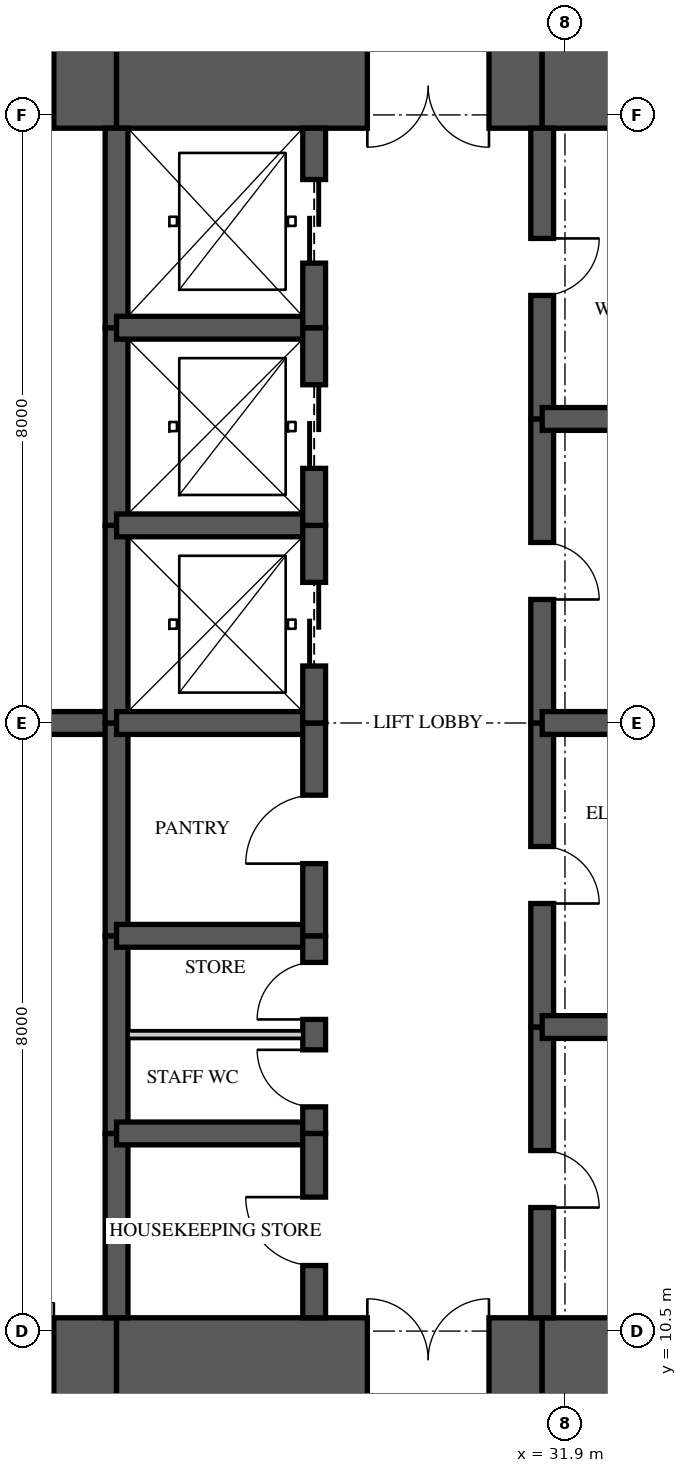
"""IFC4 building model, lengths in metres.
Left out: names, types, materials, properties, quantities, classifications, styles, units other than length and angle.
Written with IfcOpenShell. Run it as: python <this file> out.ifc"""

import sys

from ifc_helpers import new_model, si_unit, direction, frame, frame_2d, origin, place, context, subcontext, project, spatial, rectangle, extrude, element, fill, save


model = new_model("IFC4")
c1 = context("Model", 3, precision=1e-05, world=origin(), true_north=direction((0.0, 1.0)))
c2 = subcontext(c1, "Body", "Model", "MODEL_VIEW")
j1 = project(units=[si_unit("LENGTHUNIT", "METRE"), si_unit("PLANEANGLEUNIT", "RADIAN")], contexts=[c1])
p1 = place(None, origin())
s1 = spatial("IfcSite", under=j1, at=p1, CompositionType="ELEMENT")
p2 = place(p1, origin())
s2 = spatial("IfcBuilding", under=s1, at=p2, CompositionType="ELEMENT")
p3 = place(p2, frame((0.0, 0.0, 263.85)))
s3 = spatial("IfcBuildingStorey", under=s2, at=p3, CompositionType="ELEMENT", Elevation=263.85)
p4 = place(p3, frame((19.725, 10.125, 0.0), z_axis=(0.0, 0.0, 1.0), x_axis=(1.0, 0.0, 0.0)))
e1 = element("IfcWall", 1, at=p4, inside=s3, PredefinedType="SHEAR", context=c2, shape_type="SweptSolid", body=[
    extrude(rectangle(XDim=6.275, YDim=1.1, at=frame_2d((3.137, 0.0))), origin(), (0.0, 0.0, 1.0), 3.9),
])
p5 = place(p4, frame((4.7, 0.0, 0.0)))
e2 = element("IfcOpeningElement", 2, at=p5, cuts=e1, PredefinedType="OPENING", context=c2, shape_type="SweptSolid", body=[
    extrude(rectangle(XDim=0.75, YDim=2.1, at=frame_2d((0.375, 1.05))), frame((0.0, 0.56, 0.0), z_axis=(0.0, -1.0, 0.0), x_axis=(1.0, 0.0, 0.0)), (0.0, 0.0, 1.0), 1.12),
])
p6 = place(p3, frame((26.0, 10.125, 0.0), z_axis=(0.0, 0.0, 1.0), x_axis=(1.0, 0.0, 0.0)))
e3 = element("IfcWall", 3, at=p6, inside=s3, PredefinedType="SHEAR", context=c2, shape_type="SweptSolid", body=[
    extrude(rectangle(XDim=5.6, YDim=1.1, at=frame_2d((2.8, 0.0))), origin(), (0.0, 0.0, 1.0), 3.9),
])
p7 = place(p6, frame((3.3, 0.0, 0.0)))
e4 = element("IfcOpeningElement", 4, at=p7, cuts=e3, PredefinedType="OPENING", context=c2, shape_type="SweptSolid", body=[
    extrude(rectangle(XDim=1.6, YDim=2.1, at=frame_2d((0.8, 1.05))), frame((0.0, 0.56, 0.0), z_axis=(0.0, -1.0, 0.0), x_axis=(1.0, 0.0, 0.0)), (0.0, 0.0, 1.0), 1.12),
])
for number, where, z_axis, x_axis in (
    (5, (31.6, 10.125, 0.0), (0.0, 0.0, 1.0), (1.0, 0.0, 0.0)),
    (6, (35.9, 26.875, 0.0), (0.0, 0.0, 1.0), (-1.0, 0.0, 0.0)),
):
    element("IfcWall", number, at=place(p3, frame(where, z_axis=z_axis, x_axis=x_axis)), inside=s3, PredefinedType="SHEAR", context=c2, shape_type="SweptSolid", body=[
        extrude(rectangle(XDim=4.3, YDim=1.1, at=frame_2d((2.15, 0.0))), origin(), (0.0, 0.0, 1.0), 3.9),
    ])
p8 = place(p3, frame((31.6, 26.875, 0.0), z_axis=(0.0, 0.0, 1.0), x_axis=(-1.0, 0.0, 0.0)))
e7 = element("IfcWall", 7, at=p8, inside=s3, PredefinedType="SHEAR", context=c2, shape_type="SweptSolid", body=[
    extrude(rectangle(XDim=5.6, YDim=1.1, at=frame_2d((2.8, 0.0))), origin(), (0.0, 0.0, 1.0), 3.9),
])
p9 = place(p8, frame((0.7, 0.0, 0.0)))
e8 = element("IfcOpeningElement", 8, at=p9, cuts=e7, PredefinedType="OPENING", context=c2, shape_type="SweptSolid", body=[
    extrude(rectangle(XDim=1.6, YDim=2.1, at=frame_2d((0.8, 1.05))), frame((0.0, 0.56, 0.0), z_axis=(0.0, -1.0, 0.0), x_axis=(1.0, 0.0, 0.0)), (0.0, 0.0, 1.0), 1.12),
])
p10 = place(p3, frame((26.0, 26.875, 0.0), z_axis=(0.0, 0.0, 1.0), x_axis=(-1.0, 0.0, 0.0)))
e9 = element("IfcWall", 9, at=p10, inside=s3, PredefinedType="SHEAR", context=c2, shape_type="SweptSolid", body=[
    extrude(rectangle(XDim=6.275, YDim=1.1, at=frame_2d((3.137, 0.0))), origin(), (0.0, 0.0, 1.0), 3.9),
])
p11 = place(p10, frame((0.825, 0.0, 0.0)))
e10 = element("IfcOpeningElement", 10, at=p11, cuts=e9, PredefinedType="OPENING", context=c2, shape_type="SweptSolid", body=[
    extrude(rectangle(XDim=0.75, YDim=2.1, at=frame_2d((0.375, 1.05))), frame((0.0, 0.56, 0.0), z_axis=(0.0, -1.0, 0.0), x_axis=(1.0, 0.0, 0.0)), (0.0, 0.0, 1.0), 1.12),
])
p12 = place(p3, frame((26.0, 10.675, 0.0), z_axis=(0.0, 0.0, 1.0), x_axis=(0.0, 1.0, 0.0)))
e11 = element("IfcWall", 11, at=p12, inside=s3, PredefinedType="SHEAR", context=c2, shape_type="SweptSolid", body=[
    extrude(rectangle(XDim=2.425, YDim=0.3, at=frame_2d((1.212, 0.0))), origin(), (0.0, 0.0, 1.0), 3.9),
])
p13 = place(p3, frame((26.0, 13.1, 0.0), z_axis=(0.0, 0.0, 1.0), x_axis=(0.0, 1.0, 0.0)))
e12 = element("IfcWall", 12, at=p13, inside=s3, PredefinedType="SHEAR", context=c2, shape_type="SweptSolid", body=[
    extrude(rectangle(XDim=2.6, YDim=0.3, at=frame_2d((1.3, 0.0))), origin(), (0.0, 0.0, 1.0), 3.9),
])
p14 = place(p3, frame((26.0, 15.7, 0.0), z_axis=(0.0, 0.0, 1.0), x_axis=(0.0, 1.0, 0.0)))
e13 = element("IfcWall", 13, at=p14, inside=s3, PredefinedType="SHEAR", context=c2, shape_type="SweptSolid", body=[
    extrude(rectangle(XDim=2.8, YDim=0.3, at=frame_2d((1.4, 0.0))), origin(), (0.0, 0.0, 1.0), 3.9),
])
p15 = place(p3, frame((26.0, 18.5, 0.0), z_axis=(0.0, 0.0, 1.0), x_axis=(0.0, 1.0, 0.0)))
e14 = element("IfcWall", 14, at=p15, inside=s3, PredefinedType="SHEAR", context=c2, shape_type="SweptSolid", body=[
    extrude(rectangle(XDim=2.6, YDim=0.3, at=frame_2d((1.3, 0.0))), origin(), (0.0, 0.0, 1.0), 3.9),
])
p16 = place(p3, frame((26.0, 21.1, 0.0), z_axis=(0.0, 0.0, 1.0), x_axis=(0.0, 1.0, 0.0)))
e15 = element("IfcWall", 15, at=p16, inside=s3, PredefinedType="SHEAR", context=c2, shape_type="SweptSolid", body=[
    extrude(rectangle(XDim=2.6, YDim=0.3, at=frame_2d((1.3, 0.0))), origin(), (0.0, 0.0, 1.0), 3.9),
])
p17 = place(p3, frame((26.0, 23.7, 0.0), z_axis=(0.0, 0.0, 1.0), x_axis=(0.0, 1.0, 0.0)))
e16 = element("IfcWall", 16, at=p17, inside=s3, PredefinedType="SHEAR", context=c2, shape_type="SweptSolid", body=[
    extrude(rectangle(XDim=2.625, YDim=0.3, at=frame_2d((1.312, 0.0))), origin(), (0.0, 0.0, 1.0), 3.9),
])
p18 = place(p3, frame((28.6, 10.675, 0.0), z_axis=(0.0, 0.0, 1.0), x_axis=(0.0, 1.0, 0.0)))
e17 = element("IfcWall", 17, at=p18, inside=s3, PredefinedType="SHEAR", context=c2, shape_type="SweptSolid", body=[
    extrude(rectangle(XDim=2.425, YDim=0.3, at=frame_2d((1.212, 0.0))), origin(), (0.0, 0.0, 1.0), 3.9),
])
p19 = place(p18, frame((0.688, 0.0, 0.0)))
e18 = element("IfcOpeningElement", 18, at=p19, cuts=e17, PredefinedType="OPENING", context=c2, shape_type="SweptSolid", body=[
    extrude(rectangle(XDim=0.9, YDim=2.1, at=frame_2d((0.45, 1.05))), frame((0.0, 0.16, 0.0), z_axis=(0.0, -1.0, 0.0), x_axis=(1.0, 0.0, 0.0)), (0.0, 0.0, 1.0), 0.32),
])
p20 = place(p3, frame((28.6, 13.1, 0.0), z_axis=(0.0, 0.0, 1.0), x_axis=(0.0, 1.0, 0.0)))
e19 = element("IfcWall", 19, at=p20, inside=s3, PredefinedType="SHEAR", context=c2, shape_type="SweptSolid", body=[
    extrude(rectangle(XDim=2.6, YDim=0.3, at=frame_2d((1.3, 0.0))), origin(), (0.0, 0.0, 1.0), 3.9),
])
p21 = place(p20, frame((0.35, 0.0, 0.0)))
e20 = element("IfcOpeningElement", 20, at=p21, cuts=e19, PredefinedType="OPENING", context=c2, shape_type="SweptSolid", body=[
    extrude(rectangle(XDim=0.75, YDim=2.1, at=frame_2d((0.375, 1.05))), frame((0.0, 0.16, 0.0), z_axis=(0.0, -1.0, 0.0), x_axis=(1.0, 0.0, 0.0)), (0.0, 0.0, 1.0), 0.32),
])
p22 = place(p20, frame((1.5, 0.0, 0.0)))
e21 = element("IfcOpeningElement", 21, at=p22, cuts=e19, PredefinedType="OPENING", context=c2, shape_type="SweptSolid", body=[
    extrude(rectangle(XDim=0.75, YDim=2.1, at=frame_2d((0.375, 1.05))), frame((0.0, 0.16, 0.0), z_axis=(0.0, -1.0, 0.0), x_axis=(1.0, 0.0, 0.0)), (0.0, 0.0, 1.0), 0.32),
])
p23 = place(p3, frame((28.6, 15.7, 0.0), z_axis=(0.0, 0.0, 1.0), x_axis=(0.0, 1.0, 0.0)))
e22 = element("IfcWall", 22, at=p23, inside=s3, PredefinedType="SHEAR", context=c2, shape_type="SweptSolid", body=[
    extrude(rectangle(XDim=2.8, YDim=0.3, at=frame_2d((1.4, 0.0))), origin(), (0.0, 0.0, 1.0), 3.9),
])
p24 = place(p23, frame((0.95, 0.0, 0.0)))
e23 = element("IfcOpeningElement", 23, at=p24, cuts=e22, PredefinedType="OPENING", context=c2, shape_type="SweptSolid", body=[
    extrude(rectangle(XDim=0.9, YDim=2.1, at=frame_2d((0.45, 1.05))), frame((0.0, 0.16, 0.0), z_axis=(0.0, -1.0, 0.0), x_axis=(1.0, 0.0, 0.0)), (0.0, 0.0, 1.0), 0.32),
])
p25 = place(p3, frame((28.6, 18.5, 0.0), z_axis=(0.0, 0.0, 1.0), x_axis=(0.0, 1.0, 0.0)))
e24 = element("IfcWall", 24, at=p25, inside=s3, PredefinedType="SHEAR", context=c2, shape_type="SweptSolid", body=[
    extrude(rectangle(XDim=2.6, YDim=0.3, at=frame_2d((1.3, 0.0))), origin(), (0.0, 0.0, 1.0), 3.9),
])
p26 = place(p25, frame((0.75, 0.0, 0.0)))
e25 = element("IfcOpeningElement", 25, at=p26, cuts=e24, PredefinedType="OPENING", context=c2, shape_type="SweptSolid", body=[
    extrude(rectangle(XDim=1.1, YDim=2.1, at=frame_2d((0.55, 1.05))), frame((0.0, 0.16, 0.0), z_axis=(0.0, -1.0, 0.0), x_axis=(1.0, 0.0, 0.0)), (0.0, 0.0, 1.0), 0.32),
])
p27 = place(p3, frame((28.6, 21.1, 0.0), z_axis=(0.0, 0.0, 1.0), x_axis=(0.0, 1.0, 0.0)))
e26 = element("IfcWall", 26, at=p27, inside=s3, PredefinedType="SHEAR", context=c2, shape_type="SweptSolid", body=[
    extrude(rectangle(XDim=2.6, YDim=0.3, at=frame_2d((1.3, 0.0))), origin(), (0.0, 0.0, 1.0), 3.9),
])
p28 = place(p27, frame((0.75, 0.0, 0.0)))
e27 = element("IfcOpeningElement", 27, at=p28, cuts=e26, PredefinedType="OPENING", context=c2, shape_type="SweptSolid", body=[
    extrude(rectangle(XDim=1.1, YDim=2.1, at=frame_2d((0.55, 1.05))), frame((0.0, 0.16, 0.0), z_axis=(0.0, -1.0, 0.0), x_axis=(1.0, 0.0, 0.0)), (0.0, 0.0, 1.0), 0.32),
])
p29 = place(p3, frame((28.6, 23.7, 0.0), z_axis=(0.0, 0.0, 1.0), x_axis=(0.0, 1.0, 0.0)))
e28 = element("IfcWall", 28, at=p29, inside=s3, PredefinedType="SHEAR", context=c2, shape_type="SweptSolid", body=[
    extrude(rectangle(XDim=2.625, YDim=0.3, at=frame_2d((1.312, 0.0))), origin(), (0.0, 0.0, 1.0), 3.9),
])
p30 = place(p29, frame((0.85, 0.0, 0.0)))
e29 = element("IfcOpeningElement", 29, at=p30, cuts=e28, PredefinedType="OPENING", context=c2, shape_type="SweptSolid", body=[
    extrude(rectangle(XDim=1.1, YDim=2.1, at=frame_2d((0.55, 1.05))), frame((0.0, 0.16, 0.0), z_axis=(0.0, -1.0, 0.0), x_axis=(1.0, 0.0, 0.0)), (0.0, 0.0, 1.0), 0.32),
])
p31 = place(p3, frame((31.6, 10.675, 0.0), z_axis=(0.0, 0.0, 1.0), x_axis=(0.0, 1.0, 0.0)))
e30 = element("IfcWall", 30, at=p31, inside=s3, PredefinedType="SHEAR", context=c2, shape_type="SweptSolid", body=[
    extrude(rectangle(XDim=3.825, YDim=0.3, at=frame_2d((1.913, 0.0))), origin(), (0.0, 0.0, 1.0), 3.9),
])
p32 = place(p31, frame((1.45, 0.0, 0.0)))
e31 = element("IfcOpeningElement", 31, at=p32, cuts=e30, PredefinedType="OPENING", context=c2, shape_type="SweptSolid", body=[
    extrude(rectangle(XDim=0.75, YDim=2.1, at=frame_2d((0.375, 1.05))), frame((0.0, 0.16, 0.0), z_axis=(0.0, -1.0, 0.0), x_axis=(1.0, 0.0, 0.0)), (0.0, 0.0, 1.0), 0.32),
])
p33 = place(p3, frame((31.6, 14.5, 0.0), z_axis=(0.0, 0.0, 1.0), x_axis=(0.0, 1.0, 0.0)))
e32 = element("IfcWall", 32, at=p33, inside=s3, PredefinedType="SHEAR", context=c2, shape_type="SweptSolid", body=[
    extrude(rectangle(XDim=4.0, YDim=0.3, at=frame_2d((2.0, 0.0))), origin(), (0.0, 0.0, 1.0), 3.9),
])
p34 = place(p33, frame((1.625, 0.0, 0.0)))
e33 = element("IfcOpeningElement", 33, at=p34, cuts=e32, PredefinedType="OPENING", context=c2, shape_type="SweptSolid", body=[
    extrude(rectangle(XDim=0.75, YDim=2.1, at=frame_2d((0.375, 1.05))), frame((0.0, 0.16, 0.0), z_axis=(0.0, -1.0, 0.0), x_axis=(1.0, 0.0, 0.0)), (0.0, 0.0, 1.0), 0.32),
])
p35 = place(p3, frame((31.6, 18.5, 0.0), z_axis=(0.0, 0.0, 1.0), x_axis=(0.0, 1.0, 0.0)))
e34 = element("IfcWall", 34, at=p35, inside=s3, PredefinedType="SHEAR", context=c2, shape_type="SweptSolid", body=[
    extrude(rectangle(XDim=4.0, YDim=0.3, at=frame_2d((2.0, 0.0))), origin(), (0.0, 0.0, 1.0), 3.9),
])
p36 = place(p35, frame((1.625, 0.0, 0.0)))
e35 = element("IfcOpeningElement", 35, at=p36, cuts=e34, PredefinedType="OPENING", context=c2, shape_type="SweptSolid", body=[
    extrude(rectangle(XDim=0.75, YDim=2.1, at=frame_2d((0.375, 1.05))), frame((0.0, 0.16, 0.0), z_axis=(0.0, -1.0, 0.0), x_axis=(1.0, 0.0, 0.0)), (0.0, 0.0, 1.0), 0.32),
])
p37 = place(p3, frame((31.6, 22.5, 0.0), z_axis=(0.0, 0.0, 1.0), x_axis=(0.0, 1.0, 0.0)))
e36 = element("IfcWall", 36, at=p37, inside=s3, PredefinedType="SHEAR", context=c2, shape_type="SweptSolid", body=[
    extrude(rectangle(XDim=3.825, YDim=0.3, at=frame_2d((1.913, 0.0))), origin(), (0.0, 0.0, 1.0), 3.9),
])
p38 = place(p37, frame((1.625, 0.0, 0.0)))
e37 = element("IfcOpeningElement", 37, at=p38, cuts=e36, PredefinedType="OPENING", context=c2, shape_type="SweptSolid", body=[
    extrude(rectangle(XDim=0.75, YDim=2.1, at=frame_2d((0.375, 1.05))), frame((0.0, 0.16, 0.0), z_axis=(0.0, -1.0, 0.0), x_axis=(1.0, 0.0, 0.0)), (0.0, 0.0, 1.0), 0.32),
])
p39 = place(p3, frame((23.6, 18.5, 0.0), z_axis=(0.0, 0.0, 1.0), x_axis=(1.0, 0.0, 0.0)))
e38 = element("IfcWall", 38, at=p39, inside=s3, PredefinedType="SHEAR", context=c2, shape_type="SweptSolid", body=[
    extrude(rectangle(XDim=2.4, YDim=0.3, at=frame_2d((1.2, 0.0))), origin(), (0.0, 0.0, 1.0), 3.9),
])
for number, where, z_axis, x_axis in (
    (39, (26.0, 13.1, 0.0), (0.0, 0.0, 1.0), (1.0, 0.0, 0.0)),
    (40, (26.0, 15.7, 0.0), (0.0, 0.0, 1.0), (1.0, 0.0, 0.0)),
    (41, (26.0, 18.5, 0.0), (0.0, 0.0, 1.0), (1.0, 0.0, 0.0)),
    (42, (26.0, 21.1, 0.0), (0.0, 0.0, 1.0), (1.0, 0.0, 0.0)),
    (43, (26.0, 23.7, 0.0), (0.0, 0.0, 1.0), (1.0, 0.0, 0.0)),
):
    element("IfcWall", number, at=place(p3, frame(where, z_axis=z_axis, x_axis=x_axis)), inside=s3, PredefinedType="SHEAR", context=c2, shape_type="SweptSolid", body=[
        extrude(rectangle(XDim=2.6, YDim=0.3, at=frame_2d((1.3, 0.0))), origin(), (0.0, 0.0, 1.0), 3.9),
    ])
for number, where, z_axis, x_axis in (
    (44, (31.6, 14.5, 0.0), (0.0, 0.0, 1.0), (1.0, 0.0, 0.0)),
    (45, (31.6, 18.5, 0.0), (0.0, 0.0, 1.0), (1.0, 0.0, 0.0)),
    (46, (31.6, 22.5, 0.0), (0.0, 0.0, 1.0), (1.0, 0.0, 0.0)),
):
    element("IfcWall", number, at=place(p3, frame(where, z_axis=z_axis, x_axis=x_axis)), inside=s3, PredefinedType="SHEAR", context=c2, shape_type="SweptSolid", body=[
        extrude(rectangle(XDim=4.3, YDim=0.3, at=frame_2d((2.15, 0.0))), origin(), (0.0, 0.0, 1.0), 3.9),
    ])
p40 = place(p3, frame((26.15, 14.4, 0.0), z_axis=(0.0, 0.0, 1.0), x_axis=(1.0, 0.0, 0.0)))
e47 = element("IfcWall", 47, at=p40, inside=s3, PredefinedType="PARTITIONING", context=c2, shape_type="SweptSolid", body=[
    extrude(rectangle(XDim=2.3, YDim=0.1, at=frame_2d((1.15, 0.0))), origin(), (0.0, 0.0, 1.0), 3.62),
])
p41 = place(p26, origin())
e48 = element("IfcDoor", 48, at=p41, inside=s3, OperationType="SLIDING_TO_LEFT", PredefinedType="DOOR", context=c2, shape_type="SweptSolid", body=[
    extrude(rectangle(XDim=1.1, YDim=2.1, at=frame_2d((0.55, 1.05))), frame((0.0, 0.025, 0.0), z_axis=(0.0, -1.0, 0.0), x_axis=(1.0, 0.0, 0.0)), (0.0, 0.0, 1.0), 0.05),
])
fill(e25, e48)
p42 = place(p28, origin())
e49 = element("IfcDoor", 49, at=p42, inside=s3, OperationType="SLIDING_TO_LEFT", PredefinedType="DOOR", context=c2, shape_type="SweptSolid", body=[
    extrude(rectangle(XDim=1.1, YDim=2.1, at=frame_2d((0.55, 1.05))), frame((0.0, 0.025, 0.0), z_axis=(0.0, -1.0, 0.0), x_axis=(1.0, 0.0, 0.0)), (0.0, 0.0, 1.0), 0.05),
])
fill(e27, e49)
p43 = place(p30, origin())
e50 = element("IfcDoor", 50, at=p43, inside=s3, OperationType="SLIDING_TO_LEFT", PredefinedType="DOOR", context=c2, shape_type="SweptSolid", body=[
    extrude(rectangle(XDim=1.1, YDim=2.1, at=frame_2d((0.55, 1.05))), frame((0.0, 0.025, 0.0), z_axis=(0.0, -1.0, 0.0), x_axis=(1.0, 0.0, 0.0)), (0.0, 0.0, 1.0), 0.05),
])
fill(e29, e50)
p44 = place(p19, origin())
e51 = element("IfcDoor", 51, at=p44, inside=s3, OperationType="SINGLE_SWING_RIGHT", PredefinedType="DOOR", context=c2, shape_type="SweptSolid", body=[
    extrude(rectangle(XDim=0.9, YDim=2.1, at=frame_2d((0.45, 1.05))), frame((0.0, 0.025, 0.0), z_axis=(0.0, -1.0, 0.0), x_axis=(1.0, 0.0, 0.0)), (0.0, 0.0, 1.0), 0.05),
])
fill(e18, e51)
p45 = place(p21, origin())
e52 = element("IfcDoor", 52, at=p45, inside=s3, OperationType="SINGLE_SWING_RIGHT", PredefinedType="DOOR", context=c2, shape_type="SweptSolid", body=[
    extrude(rectangle(XDim=0.75, YDim=2.1, at=frame_2d((0.375, 1.05))), frame((0.0, 0.025, 0.0), z_axis=(0.0, -1.0, 0.0), x_axis=(1.0, 0.0, 0.0)), (0.0, 0.0, 1.0), 0.05),
])
fill(e20, e52)
p46 = place(p22, origin())
e53 = element("IfcDoor", 53, at=p46, inside=s3, OperationType="SINGLE_SWING_LEFT", PredefinedType="DOOR", context=c2, shape_type="SweptSolid", body=[
    extrude(rectangle(XDim=0.75, YDim=2.1, at=frame_2d((0.375, 1.05))), frame((0.0, 0.025, 0.0), z_axis=(0.0, -1.0, 0.0), x_axis=(1.0, 0.0, 0.0)), (0.0, 0.0, 1.0), 0.05),
])
fill(e21, e53)
p47 = place(p24, origin())
e54 = element("IfcDoor", 54, at=p47, inside=s3, OperationType="SINGLE_SWING_LEFT", PredefinedType="DOOR", context=c2, shape_type="SweptSolid", body=[
    extrude(rectangle(XDim=0.9, YDim=2.1, at=frame_2d((0.45, 1.05))), frame((0.0, 0.025, 0.0), z_axis=(0.0, -1.0, 0.0), x_axis=(1.0, 0.0, 0.0)), (0.0, 0.0, 1.0), 0.05),
])
fill(e23, e54)
p48 = place(p7, origin())
e55 = element("IfcDoor", 55, at=p48, inside=s3, OperationType="DOUBLE_DOOR_SINGLE_SWING", PredefinedType="DOOR", context=c2, shape_type="SweptSolid", body=[
    extrude(rectangle(XDim=1.6, YDim=2.1, at=frame_2d((0.8, 1.05))), frame((0.0, 0.025, 0.0), z_axis=(0.0, -1.0, 0.0), x_axis=(1.0, 0.0, 0.0)), (0.0, 0.0, 1.0), 0.05),
])
fill(e4, e55)
p49 = place(p9, origin())
e56 = element("IfcDoor", 56, at=p49, inside=s3, OperationType="DOUBLE_DOOR_SINGLE_SWING", PredefinedType="DOOR", context=c2, shape_type="SweptSolid", body=[
    extrude(rectangle(XDim=1.6, YDim=2.1, at=frame_2d((0.8, 1.05))), frame((0.0, 0.025, 0.0), z_axis=(0.0, -1.0, 0.0), x_axis=(1.0, 0.0, 0.0)), (0.0, 0.0, 1.0), 0.05),
])
fill(e8, e56)
p50 = place(p32, frame((0.75, 0.0, 0.0), z_axis=(0.0, 0.0, 1.0), x_axis=(-1.0, 0.0, 0.0)))
e57 = element("IfcDoor", 57, at=p50, inside=s3, OperationType="SINGLE_SWING_RIGHT", PredefinedType="DOOR", context=c2, shape_type="SweptSolid", body=[
    extrude(rectangle(XDim=0.75, YDim=2.1, at=frame_2d((0.375, 1.05))), frame((0.0, 0.025, 0.0), z_axis=(0.0, -1.0, 0.0), x_axis=(1.0, 0.0, 0.0)), (0.0, 0.0, 1.0), 0.05),
])
fill(e31, e57)
p51 = place(p34, frame((0.75, 0.0, 0.0), z_axis=(0.0, 0.0, 1.0), x_axis=(-1.0, 0.0, 0.0)))
e58 = element("IfcDoor", 58, at=p51, inside=s3, OperationType="SINGLE_SWING_RIGHT", PredefinedType="DOOR", context=c2, shape_type="SweptSolid", body=[
    extrude(rectangle(XDim=0.75, YDim=2.1, at=frame_2d((0.375, 1.05))), frame((0.0, 0.025, 0.0), z_axis=(0.0, -1.0, 0.0), x_axis=(1.0, 0.0, 0.0)), (0.0, 0.0, 1.0), 0.05),
])
fill(e33, e58)
p52 = place(p36, frame((0.75, 0.0, 0.0), z_axis=(0.0, 0.0, 1.0), x_axis=(-1.0, 0.0, 0.0)))
e59 = element("IfcDoor", 59, at=p52, inside=s3, OperationType="SINGLE_SWING_RIGHT", PredefinedType="DOOR", context=c2, shape_type="SweptSolid", body=[
    extrude(rectangle(XDim=0.75, YDim=2.1, at=frame_2d((0.375, 1.05))), frame((0.0, 0.025, 0.0), z_axis=(0.0, -1.0, 0.0), x_axis=(1.0, 0.0, 0.0)), (0.0, 0.0, 1.0), 0.05),
])
fill(e35, e59)
p53 = place(p38, frame((0.75, 0.0, 0.0), z_axis=(0.0, 0.0, 1.0), x_axis=(-1.0, 0.0, 0.0)))
e60 = element("IfcDoor", 60, at=p53, inside=s3, OperationType="SINGLE_SWING_LEFT", PredefinedType="DOOR", context=c2, shape_type="SweptSolid", body=[
    extrude(rectangle(XDim=0.75, YDim=2.1, at=frame_2d((0.375, 1.05))), frame((0.0, 0.025, 0.0), z_axis=(0.0, -1.0, 0.0), x_axis=(1.0, 0.0, 0.0)), (0.0, 0.0, 1.0), 0.05),
])
fill(e37, e60)
p54 = place(p5, origin())
e61 = element("IfcDoor", 61, at=p54, inside=s3, OperationType="SINGLE_SWING_RIGHT", PredefinedType="DOOR", context=c2, shape_type="SweptSolid", body=[
    extrude(rectangle(XDim=0.75, YDim=2.1, at=frame_2d((0.375, 1.05))), frame((0.0, 0.025, 0.0), z_axis=(0.0, -1.0, 0.0), x_axis=(1.0, 0.0, 0.0)), (0.0, 0.0, 1.0), 0.05),
])
fill(e2, e61)
p55 = place(p11, origin())
e62 = element("IfcDoor", 62, at=p55, inside=s3, OperationType="SINGLE_SWING_RIGHT", PredefinedType="DOOR", context=c2, shape_type="SweptSolid", body=[
    extrude(rectangle(XDim=0.75, YDim=2.1, at=frame_2d((0.375, 1.05))), frame((0.0, 0.025, 0.0), z_axis=(0.0, -1.0, 0.0), x_axis=(1.0, 0.0, 0.0)), (0.0, 0.0, 1.0), 0.05),
])
fill(e10, e62)
save(model, sys.argv[1])
